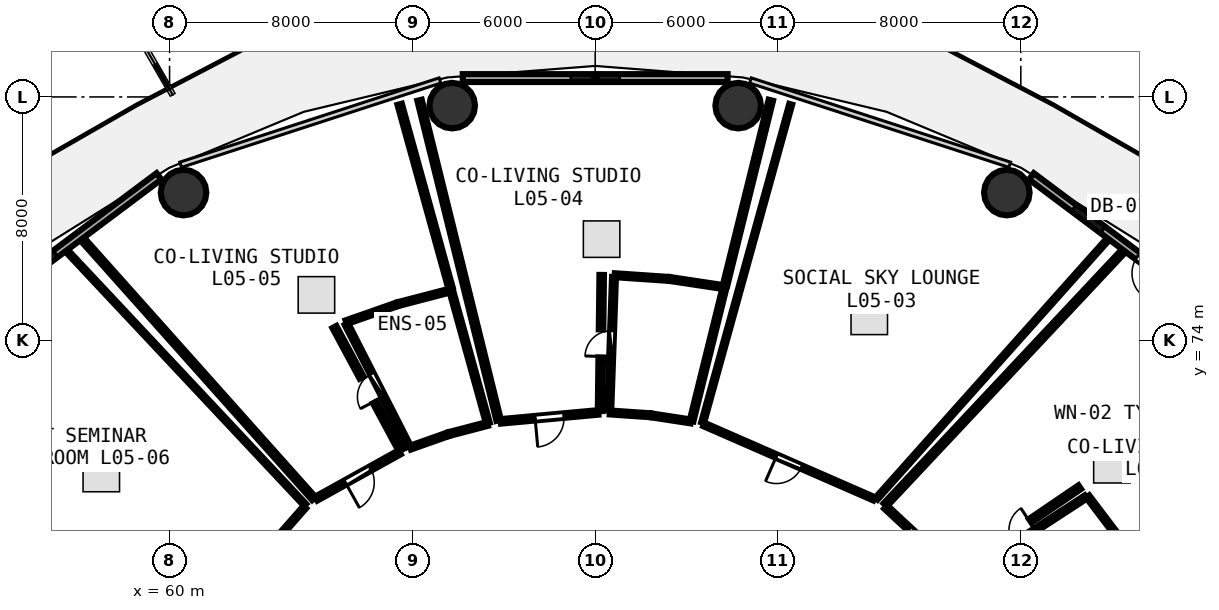
"""IFC4 building model, lengths in metres.
Left out: names, types, materials, properties, quantities, classifications, styles, units other than length and angle.
Written with IfcOpenShell. Run it as: python <this file> out.ifc"""

import sys

from ifc_helpers import new_model, si_unit, direction, frame, frame_2d, origin, origin_2d, place, context, subcontext, project, spatial, rectangle, circle, extrude, element, fill, save


model = new_model("IFC4")
c1 = context("Model", 3, precision=1e-05, world=origin(), true_north=direction((0.0, 1.0)))
c2 = subcontext(c1, "Body", "Model", "MODEL_VIEW")
j1 = project(units=[si_unit("LENGTHUNIT", "METRE"), si_unit("PLANEANGLEUNIT", "RADIAN")], contexts=[c1])
p1 = place(None, origin())
s1 = spatial("IfcSite", under=j1, at=p1, CompositionType="ELEMENT")
p2 = place(p1, origin())
s2 = spatial("IfcBuilding", under=s1, at=p2, CompositionType="ELEMENT")
p3 = place(p2, frame((0.0, 0.0, 22.5)))
s3 = spatial("IfcBuildingStorey", under=s2, at=p3, CompositionType="ELEMENT", Elevation=22.5)
for number, where, z_axis, x_axis in (
    (1, (87.54, 78.854, 0.0), (0.0, 0.0, 1.0), (1.0, 0.0, 0.0)),
    (2, (78.702, 81.714, 0.0), (0.0, 0.0, 1.0), (1.0, 0.0, 0.0)),
    (3, (69.298, 81.714, 0.0), (0.0, 0.0, 1.0), (1.0, 0.0, 0.0)),
    (4, (60.46, 78.854, 0.0), (0.0, 0.0, 1.0), (1.0, 0.0, 0.0)),
):
    element("IfcColumn", number, at=place(p3, frame(where, z_axis=z_axis, x_axis=x_axis)), inside=s3, PredefinedType="COLUMN", context=c2, shape_type="SweptSolid", body=[
        extrude(circle(Radius=0.75, at=origin_2d()), origin(), (0.0, 0.0, 1.0), 3.75),
    ])
p4 = place(p3, frame((94.984, 74.418, 0.0), z_axis=(0.0, 0.0, 1.0), x_axis=(-0.80030733173, 0.599590005569, 0.0)))
e5 = element("IfcWall", 5, at=p4, inside=s3, PredefinedType="SOLIDWALL", context=c2, shape_type="SweptSolid", body=[
    extrude(rectangle(XDim=8.291, YDim=0.26, at=frame_2d((4.145, 0.0))), origin(), (0.0, 0.0, 1.0), 3.475),
])
p5 = place(p4, frame((2.97, 0.0, 0.0)))
e6 = element("IfcOpeningElement", 6, at=p5, cuts=e5, PredefinedType="OPENING", context=c2, shape_type="SweptSolid", body=[
    extrude(rectangle(XDim=0.95, YDim=2.1, at=frame_2d((0.475, 1.05))), frame((0.0, 0.14, 0.0), z_axis=(0.0, -1.0, 0.0), x_axis=(1.0, 0.0, 0.0)), (0.0, 0.0, 1.0), 0.28),
])
p6 = place(p4, frame((5.35, 0.0, 0.85)))
e7 = element("IfcOpeningElement", 7, at=p6, cuts=e5, PredefinedType="OPENING", context=c2, shape_type="SweptSolid", body=[
    extrude(rectangle(XDim=1.2, YDim=1.45, at=frame_2d((0.6, 0.725))), frame((0.0, 0.14, 0.0), z_axis=(0.0, -1.0, 0.0), x_axis=(1.0, 0.0, 0.0)), (0.0, 0.0, 1.0), 0.28),
])
p7 = place(p3, frame((78.356, 82.62, 0.0), z_axis=(0.0, 0.0, 1.0), x_axis=(-1.0, 0.0, 0.0)))
e8 = element("IfcWall", 8, at=p7, inside=s3, PredefinedType="SOLIDWALL", context=c2, shape_type="SweptSolid", body=[
    extrude(rectangle(XDim=8.712, YDim=0.26, at=frame_2d((4.356, 0.0))), origin(), (0.0, 0.0, 1.0), 3.475),
])
p8 = place(p7, frame((3.556, 0.0, 0.85)))
e9 = element("IfcOpeningElement", 9, at=p8, cuts=e8, PredefinedType="OPENING", context=c2, shape_type="SweptSolid", body=[
    extrude(rectangle(XDim=1.6, YDim=1.45, at=frame_2d((0.8, 0.725))), frame((0.0, 0.14, 0.0), z_axis=(0.0, -1.0, 0.0), x_axis=(1.0, 0.0, 0.0)), (0.0, 0.0, 1.0), 0.28),
])
p9 = place(p3, frame((59.651, 79.389, 0.0), z_axis=(0.0, 0.0, 1.0), x_axis=(-0.80030733173, -0.599590005569, 0.0)))
e10 = element("IfcWall", 10, at=p9, inside=s3, PredefinedType="SOLIDWALL", context=c2, shape_type="SweptSolid", body=[
    extrude(rectangle(XDim=8.291, YDim=0.26, at=frame_2d((4.145, 0.0))), origin(), (0.0, 0.0, 1.0), 3.475),
])
p10 = place(p9, frame((4.245, 0.0, 0.85)))
e11 = element("IfcOpeningElement", 11, at=p10, cuts=e10, PredefinedType="OPENING", context=c2, shape_type="SweptSolid", body=[
    extrude(rectangle(XDim=1.6, YDim=1.45, at=frame_2d((0.8, 0.725))), frame((0.0, 0.14, 0.0), z_axis=(0.0, -1.0, 0.0), x_axis=(1.0, 0.0, 0.0)), (0.0, 0.0, 1.0), 0.28),
])
p11 = place(p3, frame((86.083, 66.2, 0.0), z_axis=(0.0, 0.0, 1.0), x_axis=(0.837796261941, 0.545982988267, 0.0)))
e12 = element("IfcWall", 12, at=p11, inside=s3, PredefinedType="PLUMBINGWALL", context=c2, shape_type="SweptSolid", body=[
    extrude(rectangle(XDim=4.838, YDim=0.13, at=frame_2d((2.419, 0.0))), origin(), (0.0, 0.0, 1.0), 3.235),
])
p12 = place(p11, frame((1.989, 0.0, 0.0)))
e13 = element("IfcOpeningElement", 13, at=p12, cuts=e12, PredefinedType="OPENING", context=c2, shape_type="SweptSolid", body=[
    extrude(rectangle(XDim=0.86, YDim=2.05, at=frame_2d((0.43, 1.025))), frame((0.0, 0.075, 0.0), z_axis=(0.0, -1.0, 0.0), x_axis=(1.0, 0.0, 0.0)), (0.0, 0.0, 1.0), 0.15),
])
p13 = place(p3, frame((85.806, 66.425, 0.0), z_axis=(0.0, 0.0, 1.0), x_axis=(-0.7329267348, 0.680307578538, 0.0)))
e14 = element("IfcWall", 14, at=p13, inside=s3, PredefinedType="PARTITIONING", context=c2, shape_type="SweptSolid", body=[
    extrude(rectangle(XDim=3.067, YDim=0.15, at=frame_2d((1.533, 0.0))), origin(), (0.0, 0.0, 1.0), 2.875),
])
p14 = place(p13, frame((1.059, 0.0, 0.0)))
e15 = element("IfcOpeningElement", 15, at=p14, cuts=e14, PredefinedType="OPENING", context=c2, shape_type="SweptSolid", body=[
    extrude(rectangle(XDim=0.95, YDim=2.08, at=frame_2d((0.475, 1.04))), frame((0.0, 0.085, 0.0), z_axis=(0.0, -1.0, 0.0), x_axis=(1.0, 0.0, 0.0)), (0.0, 0.0, 1.0), 0.17),
])
p15 = place(p3, frame((83.172, 68.783, 0.0), z_axis=(0.0, 0.0, 1.0), x_axis=(-0.916419655578, 0.400218708797, 0.0)))
e16 = element("IfcWall", 16, at=p15, inside=s3, PredefinedType="PARTITIONING", context=c2, shape_type="SweptSolid", body=[
    extrude(rectangle(XDim=6.104, YDim=0.12, at=frame_2d((3.052, 0.0))), origin(), (0.0, 0.0, 1.0), 2.875),
])
p16 = place(p15, frame((2.602, 0.0, 0.0)))
e17 = element("IfcOpeningElement", 17, at=p16, cuts=e16, PredefinedType="OPENING", context=c2, shape_type="SweptSolid", body=[
    extrude(rectangle(XDim=0.9, YDim=2.08, at=frame_2d((0.45, 1.04))), frame((0.0, 0.07, 0.0), z_axis=(0.0, -1.0, 0.0), x_axis=(1.0, 0.0, 0.0)), (0.0, 0.0, 1.0), 0.14),
])
p17 = place(p3, frame((74.463, 71.684, 0.0), z_axis=(0.0, 0.0, 1.0), x_axis=(0.035428098094, 0.999372227884, 0.0)))
e18 = element("IfcWall", 18, at=p17, inside=s3, PredefinedType="PLUMBINGWALL", context=c2, shape_type="SweptSolid", body=[
    extrude(rectangle(XDim=4.396, YDim=0.13, at=frame_2d((2.198, 0.0))), origin(), (0.0, 0.0, 1.0), 3.175),
])
p18 = place(p17, frame((1.768, 0.0, 0.0)))
e19 = element("IfcOpeningElement", 19, at=p18, cuts=e18, PredefinedType="OPENING", context=c2, shape_type="SweptSolid", body=[
    extrude(rectangle(XDim=0.86, YDim=2.05, at=frame_2d((0.43, 1.025))), frame((0.0, 0.075, 0.0), z_axis=(0.0, -1.0, 0.0), x_axis=(1.0, 0.0, 0.0)), (0.0, 0.0, 1.0), 0.15),
])
p19 = place(p3, frame((74.1, 71.624, 0.0), z_axis=(0.0, 0.0, 1.0), x_axis=(-0.995822031417, -0.091315287572, 0.0)))
e20 = element("IfcWall", 20, at=p19, inside=s3, PredefinedType="PARTITIONING", context=c2, shape_type="SweptSolid", body=[
    extrude(rectangle(XDim=3.219, YDim=0.15, at=frame_2d((1.609, 0.0))), origin(), (0.0, 0.0, 1.0), 3.235),
])
p20 = place(p19, frame((1.135, 0.0, 0.0)))
e21 = element("IfcOpeningElement", 21, at=p20, cuts=e20, PredefinedType="OPENING", context=c2, shape_type="SweptSolid", body=[
    extrude(rectangle(XDim=0.95, YDim=2.08, at=frame_2d((0.475, 1.04))), frame((0.0, 0.085, 0.0), z_axis=(0.0, -1.0, 0.0), x_axis=(1.0, 0.0, 0.0)), (0.0, 0.0, 1.0), 0.17),
])
p21 = place(p3, frame((67.87, 70.51, 0.0), z_axis=(0.0, 0.0, 1.0), x_axis=(-0.45442479933, 0.890785104138, 0.0)))
e22 = element("IfcWall", 22, at=p21, inside=s3, PredefinedType="PLUMBINGWALL", context=c2, shape_type="SweptSolid", body=[
    extrude(rectangle(XDim=4.514, YDim=0.13, at=frame_2d((2.257, 0.0))), origin(), (0.0, 0.0, 1.0), 3.175),
])
p22 = place(p21, frame((1.827, 0.0, 0.0)))
e23 = element("IfcOpeningElement", 23, at=p22, cuts=e22, PredefinedType="OPENING", context=c2, shape_type="SweptSolid", body=[
    extrude(rectangle(XDim=0.86, YDim=2.05, at=frame_2d((0.43, 1.025))), frame((0.0, 0.075, 0.0), z_axis=(0.0, -1.0, 0.0), x_axis=(1.0, 0.0, 0.0)), (0.0, 0.0, 1.0), 0.15),
])
p23 = place(p3, frame((67.571, 70.313, 0.0), z_axis=(0.0, 0.0, 1.0), x_axis=(-0.874179278891, -0.48560332408, 0.0)))
e24 = element("IfcWall", 24, at=p23, inside=s3, PredefinedType="PARTITIONING", context=c2, shape_type="SweptSolid", body=[
    extrude(rectangle(XDim=3.14, YDim=0.15, at=frame_2d((1.57, 0.0))), origin(), (0.0, 0.0, 1.0), 3.48),
])
p24 = place(p23, frame((1.095, 0.0, 0.0)))
e25 = element("IfcOpeningElement", 25, at=p24, cuts=e24, PredefinedType="OPENING", context=c2, shape_type="SweptSolid", body=[
    extrude(rectangle(XDim=0.95, YDim=2.08, at=frame_2d((0.475, 1.04))), frame((0.0, 0.085, 0.0), z_axis=(0.0, -1.0, 0.0), x_axis=(1.0, 0.0, 0.0)), (0.0, 0.0, 1.0), 0.17),
])
p25 = place(p3, frame((64.446, 68.507, 0.0), z_axis=(0.0, 0.0, 1.0), x_axis=(-0.660323401664, -0.75098136143, 0.0)))
e26 = element("IfcWall", 26, at=p25, inside=s3, PredefinedType="PARTITIONING", context=c2, shape_type="SweptSolid", body=[
    extrude(rectangle(XDim=5.857, YDim=0.12, at=frame_2d((2.929, 0.0))), origin(), (0.0, 0.0, 1.0), 2.875),
])
p26 = place(p25, frame((2.479, 0.0, 0.0)))
e27 = element("IfcOpeningElement", 27, at=p26, cuts=e26, PredefinedType="OPENING", context=c2, shape_type="SweptSolid", body=[
    extrude(rectangle(XDim=0.9, YDim=2.08, at=frame_2d((0.45, 1.04))), frame((0.0, 0.07, 0.0), z_axis=(0.0, -1.0, 0.0), x_axis=(1.0, 0.0, 0.0)), (0.0, 0.0, 1.0), 0.14),
])
p27 = place(p3, frame((87.657, 63.778, 0.0), z_axis=(0.0, 0.0, 1.0), x_axis=(0.926333713065, 0.376703931542, 0.0)))
e28 = element("IfcWall", 28, at=p27, inside=s3, PredefinedType="PARTITIONING", context=c2, shape_type="SweptSolid", body=[
    extrude(rectangle(XDim=12.099, YDim=0.15, at=frame_2d((6.05, 0.0))), origin(), (0.0, 0.0, 1.0), 2.875),
])
p28 = place(p3, frame((90.199, 68.858, 0.0), z_axis=(0.0, 0.0, 1.0), x_axis=(0.60376191721, -0.797164692725, 0.0)))
e29 = element("IfcWall", 29, at=p28, inside=s3, PredefinedType="PLUMBINGWALL", context=c2, shape_type="SweptSolid", body=[
    extrude(rectangle(XDim=1.669, YDim=0.13, at=frame_2d((0.834, 0.0))), origin(), (0.0, 0.0, 1.0), 3.175),
])
p29 = place(p3, frame((83.542, 68.581, 0.0), z_axis=(0.0, 0.0, 1.0), x_axis=(0.684261294523, 0.729236916796, 0.0)))
e30 = element("IfcWall", 30, at=p29, inside=s3, PredefinedType="PARTITIONING", context=c2, shape_type="SweptSolid", body=[
    extrude(rectangle(XDim=11.438, YDim=0.15, at=frame_2d((5.719, 0.0))), origin(), (0.0, 0.0, 1.0), 2.875),
])
p30 = place(p3, frame((89.939, 69.166, 0.0), z_axis=(0.0, 0.0, 1.0), x_axis=(-0.826811291248, -0.562479411769, 0.0)))
e31 = element("IfcWall", 31, at=p30, inside=s3, PredefinedType="PARTITIONING", context=c2, shape_type="SweptSolid", body=[
    extrude(rectangle(XDim=1.971, YDim=0.15, at=frame_2d((0.985, 0.0))), origin(), (0.0, 0.0, 1.0), 3.48),
])
p31 = place(p3, frame((77.534, 71.289, 0.0), z_axis=(0.0, 0.0, 1.0), x_axis=(0.26671307518, 0.963775977875, 0.0)))
e32 = element("IfcWall", 32, at=p31, inside=s3, PredefinedType="PARTITIONING", context=c2, shape_type="SweptSolid", body=[
    extrude(rectangle(XDim=10.865, YDim=0.1, at=frame_2d((5.432, 0.0))), origin(), (0.0, 0.0, 1.0), 2.875),
])
p32 = place(p3, frame((90.844, 77.294, 0.0), z_axis=(0.0, 0.0, 1.0), x_axis=(-0.66580890104, -0.746122313897, 0.0)))
e33 = element("IfcWall", 33, at=p32, inside=s3, PredefinedType="PARTITIONING", context=c2, shape_type="SweptSolid", body=[
    extrude(rectangle(XDim=11.399, YDim=0.1, at=frame_2d((5.7, 0.0))), origin(), (0.0, 0.0, 1.0), 2.875),
])
p33 = place(p3, frame((77.145, 71.327, 0.0), z_axis=(0.0, 0.0, 1.0), x_axis=(-0.988427236939, 0.151695739152, 0.0)))
e34 = element("IfcWall", 34, at=p33, inside=s3, PredefinedType="PLUMBINGWALL", context=c2, shape_type="SweptSolid", body=[
    extrude(rectangle(XDim=1.32, YDim=0.13, at=frame_2d((0.66, 0.0))), origin(), (0.0, 0.0, 1.0), 3.235),
])
p34 = place(p3, frame((75.801, 71.531, 0.0), z_axis=(0.0, 0.0, 1.0), x_axis=(-0.997629018134, 0.068821088175, 0.0)))
e35 = element("IfcWall", 35, at=p34, inside=s3, PredefinedType="PLUMBINGWALL", context=c2, shape_type="SweptSolid", body=[
    extrude(rectangle(XDim=1.323, YDim=0.13, at=frame_2d((0.662, 0.0))), origin(), (0.0, 0.0, 1.0), 3.48),
])
p35 = place(p3, frame((74.641, 76.137, 0.0), z_axis=(0.0, 0.0, 1.0), x_axis=(0.997667905772, -0.06825503493, 0.0)))
e36 = element("IfcWall", 36, at=p35, inside=s3, PredefinedType="PLUMBINGWALL", context=c2, shape_type="SweptSolid", body=[
    extrude(rectangle(XDim=1.792, YDim=0.13, at=frame_2d((0.896, 0.0))), origin(), (0.0, 0.0, 1.0), 3.48),
])
p36 = place(p3, frame((76.469, 76.01, 0.0), z_axis=(0.0, 0.0, 1.0), x_axis=(0.988799846431, -0.14924765894, 0.0)))
e37 = element("IfcWall", 37, at=p36, inside=s3, PredefinedType="PLUMBINGWALL", context=c2, shape_type="SweptSolid", body=[
    extrude(rectangle(XDim=1.79, YDim=0.13, at=frame_2d((0.895, 0.0))), origin(), (0.0, 0.0, 1.0), 3.48),
])
p37 = place(p3, frame((78.253, 75.721, 0.0), z_axis=(0.0, 0.0, 1.0), x_axis=(-0.240229117536, -0.970716215528, 0.0)))
e38 = element("IfcWall", 38, at=p37, inside=s3, PredefinedType="PLUMBINGWALL", context=c2, shape_type="SweptSolid", body=[
    extrude(rectangle(XDim=4.509, YDim=0.13, at=frame_2d((2.255, 0.0))), origin(), (0.0, 0.0, 1.0), 3.175),
])
p38 = place(p3, frame((70.825, 71.363, 0.0), z_axis=(0.0, 0.0, 1.0), x_axis=(-0.239971369295, 0.970779965759, 0.0)))
e39 = element("IfcWall", 39, at=p38, inside=s3, PredefinedType="PARTITIONING", context=c2, shape_type="SweptSolid", body=[
    extrude(rectangle(XDim=10.846, YDim=0.15, at=frame_2d((5.423, 0.0))), origin(), (0.0, 0.0, 1.0), 2.875),
])
p39 = place(p3, frame((79.777, 81.892, 0.0), z_axis=(0.0, 0.0, 1.0), x_axis=(-0.240000910349, -0.970772662899, 0.0)))
e40 = element("IfcWall", 40, at=p39, inside=s3, PredefinedType="PARTITIONING", context=c2, shape_type="SweptSolid", body=[
    extrude(rectangle(XDim=6.257, YDim=0.15, at=frame_2d((3.128, 0.0))), origin(), (0.0, 0.0, 1.0), 2.875),
])
p40 = place(p3, frame((74.215, 76.146, 0.0), z_axis=(0.0, 0.0, 1.0), x_axis=(-0.012119496596, -0.999926556204, 0.0)))
e41 = element("IfcWall", 41, at=p40, inside=s3, PredefinedType="PARTITIONING", context=c2, shape_type="SweptSolid", body=[
    extrude(rectangle(XDim=1.793, YDim=0.15, at=frame_2d((0.896, 0.0))), origin(), (0.0, 0.0, 1.0), 3.175),
])
p41 = place(p3, frame((74.182, 73.433, 0.0), z_axis=(0.0, 0.0, 1.0), x_axis=(-0.01217734225, -0.999925853419, 0.0)))
e42 = element("IfcWall", 42, at=p41, inside=s3, PredefinedType="PARTITIONING", context=c2, shape_type="SweptSolid", body=[
    extrude(rectangle(XDim=1.764, YDim=0.15, at=frame_2d((0.882, 0.0))), origin(), (0.0, 0.0, 1.0), 3.48),
])
p42 = place(p3, frame((70.458, 71.245, 0.0), z_axis=(0.0, 0.0, 1.0), x_axis=(-0.967235526128, -0.253880753498, 0.0)))
e43 = element("IfcWall", 43, at=p42, inside=s3, PredefinedType="PLUMBINGWALL", context=c2, shape_type="SweptSolid", body=[
    extrude(rectangle(XDim=1.314, YDim=0.13, at=frame_2d((0.657, 0.0))), origin(), (0.0, 0.0, 1.0), 3.235),
])
p43 = place(p3, frame((69.148, 70.899, 0.0), z_axis=(0.0, 0.0, 1.0), x_axis=(-0.942537812533, -0.33409949408, 0.0)))
e44 = element("IfcWall", 44, at=p43, inside=s3, PredefinedType="PLUMBINGWALL", context=c2, shape_type="SweptSolid", body=[
    extrude(rectangle(XDim=1.307, YDim=0.13, at=frame_2d((0.654, 0.0))), origin(), (0.0, 0.0, 1.0), 3.48),
])
p44 = place(p3, frame((65.81, 74.591, 0.0), z_axis=(0.0, 0.0, 1.0), x_axis=(0.943615101484, 0.331044619728, 0.0)))
e45 = element("IfcWall", 45, at=p44, inside=s3, PredefinedType="PLUMBINGWALL", context=c2, shape_type="SweptSolid", body=[
    extrude(rectangle(XDim=1.77, YDim=0.13, at=frame_2d((0.885, 0.0))), origin(), (0.0, 0.0, 1.0), 3.48),
])
p45 = place(p3, frame((67.518, 75.188, 0.0), z_axis=(0.0, 0.0, 1.0), x_axis=(0.967790422801, 0.251757219427, 0.0)))
e46 = element("IfcWall", 46, at=p45, inside=s3, PredefinedType="PLUMBINGWALL", context=c2, shape_type="SweptSolid", body=[
    extrude(rectangle(XDim=1.78, YDim=0.13, at=frame_2d((0.89, 0.0))), origin(), (0.0, 0.0, 1.0), 3.48),
])
p46 = place(p3, frame((69.265, 75.622, 0.0), z_axis=(0.0, 0.0, 1.0), x_axis=(0.267094578575, -0.963670320232, 0.0)))
e47 = element("IfcWall", 47, at=p46, inside=s3, PredefinedType="PLUMBINGWALL", context=c2, shape_type="SweptSolid", body=[
    extrude(rectangle(XDim=4.516, YDim=0.13, at=frame_2d((2.258, 0.0))), origin(), (0.0, 0.0, 1.0), 2.875),
])
p47 = place(p3, frame((64.746, 68.789, 0.0), z_axis=(0.0, 0.0, 1.0), x_axis=(-0.66580890104, 0.746122313897, 0.0)))
e48 = element("IfcWall", 48, at=p47, inside=s3, PredefinedType="PARTITIONING", context=c2, shape_type="SweptSolid", body=[
    extrude(rectangle(XDim=11.399, YDim=0.15, at=frame_2d((5.7, 0.0))), origin(), (0.0, 0.0, 1.0), 2.875),
])
p48 = place(p3, frame((67.569, 81.76, 0.0), z_axis=(0.0, 0.0, 1.0), x_axis=(0.266691519666, -0.963781942837, 0.0)))
e49 = element("IfcWall", 49, at=p48, inside=s3, PredefinedType="PARTITIONING", context=c2, shape_type="SweptSolid", body=[
    extrude(rectangle(XDim=6.268, YDim=0.15, at=frame_2d((3.134, 0.0))), origin(), (0.0, 0.0, 1.0), 2.875),
])
p49 = place(p3, frame((65.423, 74.434, 0.0), z_axis=(0.0, 0.0, 1.0), x_axis=(0.473660949034, -0.880707275637, 0.0)))
e50 = element("IfcWall", 50, at=p49, inside=s3, PredefinedType="PARTITIONING", context=c2, shape_type="SweptSolid", body=[
    extrude(rectangle(XDim=1.891, YDim=0.15, at=frame_2d((0.946, 0.0))), origin(), (0.0, 0.0, 1.0), 3.175),
])
p50 = place(p3, frame((66.754, 71.958, 0.0), z_axis=(0.0, 0.0, 1.0), x_axis=(0.473466863657, -0.880811630838, 0.0)))
e51 = element("IfcWall", 51, at=p50, inside=s3, PredefinedType="PARTITIONING", context=c2, shape_type="SweptSolid", body=[
    extrude(rectangle(XDim=1.794, YDim=0.15, at=frame_2d((0.897, 0.0))), origin(), (0.0, 0.0, 1.0), 3.235),
])
p51 = place(p3, frame((60.502, 64.079, 0.0), z_axis=(0.0, 0.0, 1.0), x_axis=(-0.917695041134, 0.397285554077, 0.0)))
e52 = element("IfcWall", 52, at=p51, inside=s3, PredefinedType="PARTITIONING", context=c2, shape_type="SweptSolid", body=[
    extrude(rectangle(XDim=12.07, YDim=0.1, at=frame_2d((6.035, 0.0))), origin(), (0.0, 0.0, 1.0), 2.875),
])
p52 = place(p3, frame((56.632, 76.922, 0.0), z_axis=(0.0, 0.0, 1.0), x_axis=(0.684261294523, -0.729236916796, 0.0)))
e53 = element("IfcWall", 53, at=p52, inside=s3, PredefinedType="PARTITIONING", context=c2, shape_type="SweptSolid", body=[
    extrude(rectangle(XDim=11.438, YDim=0.1, at=frame_2d((5.719, 0.0))), origin(), (0.0, 0.0, 1.0), 2.875),
])
p53 = place(p5, frame((0.95, 0.0, 0.0), z_axis=(0.0, 0.0, 1.0), x_axis=(-1.0, 0.0, 0.0)))
e54 = element("IfcDoor", 54, at=p53, inside=s3, OperationType="SINGLE_SWING_RIGHT", PredefinedType="DOOR", context=c2, shape_type="SweptSolid", body=[
    extrude(rectangle(XDim=0.95, YDim=2.1, at=frame_2d((0.475, 1.05))), frame((0.0, 0.025, 0.0), z_axis=(0.0, -1.0, 0.0), x_axis=(1.0, 0.0, 0.0)), (0.0, 0.0, 1.0), 0.05),
])
fill(e6, e54)
p54 = place(p6, origin())
e55 = element("IfcWindow", 55, at=p54, inside=s3, PartitioningType="SINGLE_PANEL", PredefinedType="WINDOW", context=c2, shape_type="SweptSolid", body=[
    extrude(rectangle(XDim=1.2, YDim=1.45, at=frame_2d((0.6, 0.725))), frame((0.0, 0.03, 0.0), z_axis=(0.0, -1.0, 0.0), x_axis=(1.0, 0.0, 0.0)), (0.0, 0.0, 1.0), 0.06),
])
fill(e7, e55)
p55 = place(p8, origin())
e56 = element("IfcWindow", 56, at=p55, inside=s3, PartitioningType="SINGLE_PANEL", PredefinedType="WINDOW", context=c2, shape_type="SweptSolid", body=[
    extrude(rectangle(XDim=1.6, YDim=1.45, at=frame_2d((0.8, 0.725))), frame((0.0, 0.03, 0.0), z_axis=(0.0, -1.0, 0.0), x_axis=(1.0, 0.0, 0.0)), (0.0, 0.0, 1.0), 0.06),
])
fill(e9, e56)
p56 = place(p10, origin())
e57 = element("IfcWindow", 57, at=p56, inside=s3, PartitioningType="SINGLE_PANEL", PredefinedType="WINDOW", context=c2, shape_type="SweptSolid", body=[
    extrude(rectangle(XDim=1.6, YDim=1.45, at=frame_2d((0.8, 0.725))), frame((0.0, 0.03, 0.0), z_axis=(0.0, -1.0, 0.0), x_axis=(1.0, 0.0, 0.0)), (0.0, 0.0, 1.0), 0.06),
])
fill(e11, e57)
p57 = place(p12, origin())
e58 = element("IfcDoor", 58, at=p57, inside=s3, OperationType="SINGLE_SWING_RIGHT", PredefinedType="DOOR", context=c2, shape_type="SweptSolid", body=[
    extrude(rectangle(XDim=0.86, YDim=2.05, at=frame_2d((0.43, 1.025))), frame((0.0, 0.025, 0.0), z_axis=(0.0, -1.0, 0.0), x_axis=(1.0, 0.0, 0.0)), (0.0, 0.0, 1.0), 0.05),
])
fill(e13, e58)
p58 = place(p14, origin())
e59 = element("IfcDoor", 59, at=p58, inside=s3, OperationType="SINGLE_SWING_LEFT", PredefinedType="DOOR", context=c2, shape_type="SweptSolid", body=[
    extrude(rectangle(XDim=0.95, YDim=2.08, at=frame_2d((0.475, 1.04))), frame((0.0, 0.025, 0.0), z_axis=(0.0, -1.0, 0.0), x_axis=(1.0, 0.0, 0.0)), (0.0, 0.0, 1.0), 0.05),
])
fill(e15, e59)
p59 = place(p16, origin())
e60 = element("IfcDoor", 60, at=p59, inside=s3, OperationType="SINGLE_SWING_RIGHT", PredefinedType="DOOR", context=c2, shape_type="SweptSolid", body=[
    extrude(rectangle(XDim=0.9, YDim=2.08, at=frame_2d((0.45, 1.04))), frame((0.0, 0.025, 0.0), z_axis=(0.0, -1.0, 0.0), x_axis=(1.0, 0.0, 0.0)), (0.0, 0.0, 1.0), 0.05),
])
fill(e17, e60)
p60 = place(p18, origin())
e61 = element("IfcDoor", 61, at=p60, inside=s3, OperationType="SINGLE_SWING_LEFT", PredefinedType="DOOR", context=c2, shape_type="SweptSolid", body=[
    extrude(rectangle(XDim=0.86, YDim=2.05, at=frame_2d((0.43, 1.025))), frame((0.0, 0.025, 0.0), z_axis=(0.0, -1.0, 0.0), x_axis=(1.0, 0.0, 0.0)), (0.0, 0.0, 1.0), 0.05),
])
fill(e19, e61)
p61 = place(p20, origin())
e62 = element("IfcDoor", 62, at=p61, inside=s3, OperationType="SINGLE_SWING_RIGHT", PredefinedType="DOOR", context=c2, shape_type="SweptSolid", body=[
    extrude(rectangle(XDim=0.95, YDim=2.08, at=frame_2d((0.475, 1.04))), frame((0.0, 0.025, 0.0), z_axis=(0.0, -1.0, 0.0), x_axis=(1.0, 0.0, 0.0)), (0.0, 0.0, 1.0), 0.05),
])
fill(e21, e62)
p62 = place(p22, origin())
e63 = element("IfcDoor", 63, at=p62, inside=s3, OperationType="SINGLE_SWING_LEFT", PredefinedType="DOOR", context=c2, shape_type="SweptSolid", body=[
    extrude(rectangle(XDim=0.86, YDim=2.05, at=frame_2d((0.43, 1.025))), frame((0.0, 0.025, 0.0), z_axis=(0.0, -1.0, 0.0), x_axis=(1.0, 0.0, 0.0)), (0.0, 0.0, 1.0), 0.05),
])
fill(e23, e63)
p63 = place(p24, origin())
e64 = element("IfcDoor", 64, at=p63, inside=s3, OperationType="SINGLE_SWING_RIGHT", PredefinedType="DOOR", context=c2, shape_type="SweptSolid", body=[
    extrude(rectangle(XDim=0.95, YDim=2.08, at=frame_2d((0.475, 1.04))), frame((0.0, 0.025, 0.0), z_axis=(0.0, -1.0, 0.0), x_axis=(1.0, 0.0, 0.0)), (0.0, 0.0, 1.0), 0.05),
])
fill(e25, e64)
save(model, sys.argv[1])
